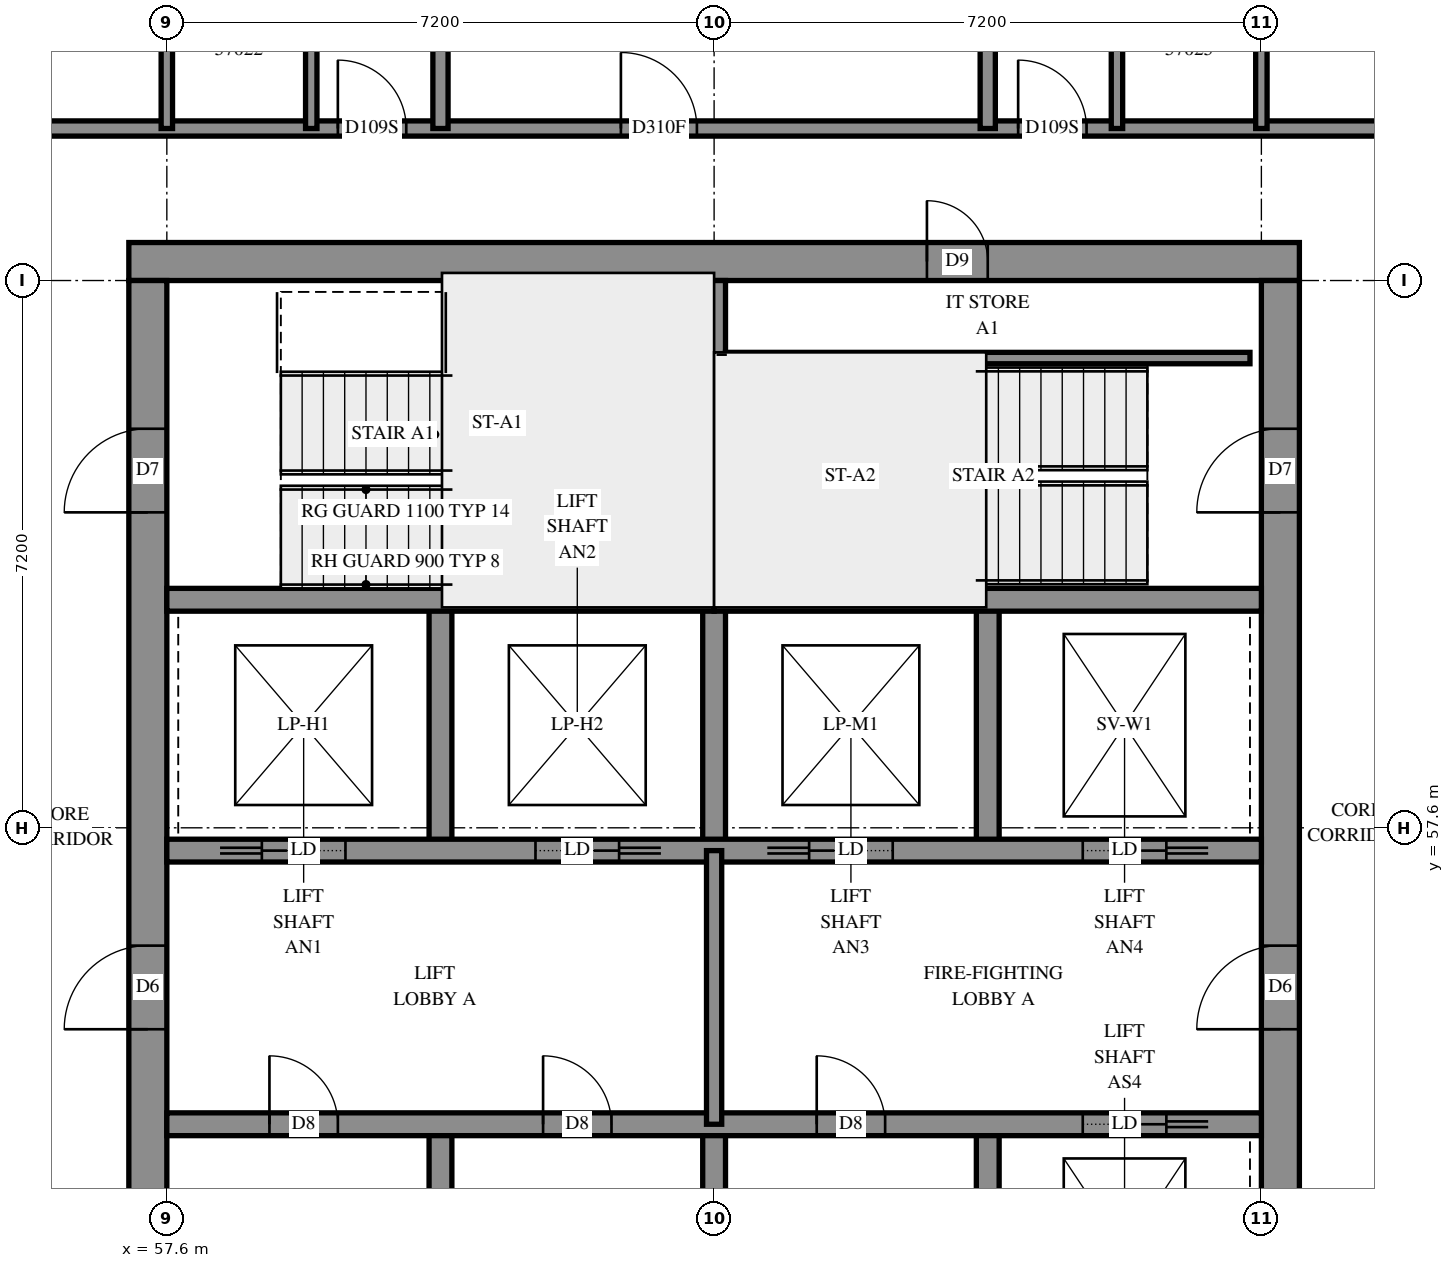
"""IFC4 building model, lengths in metres.
Left out: names, types, materials, properties, quantities, classifications, styles, units other than length and angle.
Written with IfcOpenShell. Run it as: python <this file> out.ifc"""

import sys

from ifc_helpers import new_model, si_unit, direction, frame, frame_2d, origin, place, context, subcontext, project, spatial, rectangle, extrude, element, fill, save


model = new_model("IFC4")
c1 = context("Model", 3, precision=1e-05, world=origin(), true_north=direction((0.0, 1.0)))
c2 = subcontext(c1, "Body", "Model", "MODEL_VIEW")
j1 = project(units=[si_unit("LENGTHUNIT", "METRE"), si_unit("PLANEANGLEUNIT", "RADIAN")], contexts=[c1])
p1 = place(None, origin())
s1 = spatial("IfcSite", under=j1, at=p1, CompositionType="ELEMENT")
p2 = place(p1, origin())
s2 = spatial("IfcBuilding", under=s1, at=p2, CompositionType="ELEMENT")
p3 = place(p2, frame((0.0, 0.0, 210.0)))
s3 = spatial("IfcBuildingStorey", under=s2, at=p3, CompositionType="ELEMENT", Elevation=210.0)
p4 = place(p3, frame((57.1, 65.05, -0.3), z_axis=(0.0, 0.0, 1.0), x_axis=(1.0, 0.0, 0.0)))
e1 = element("IfcWall", 1, at=p4, inside=s3, PredefinedType="SHEAR", context=c2, shape_type="SweptSolid", body=[
    extrude(rectangle(XDim=15.4, YDim=0.5, at=frame_2d((7.7, 0.0))), origin(), (0.0, 0.0, 1.0), 2.7),
])
p5 = place(p4, frame((10.5, 0.0, 0.3)))
e2 = element("IfcOpeningElement", 2, at=p5, cuts=e1, PredefinedType="OPENING", context=c2, shape_type="SweptSolid", body=[
    extrude(rectangle(XDim=0.8, YDim=2.1, at=frame_2d((0.4, 1.05))), frame((0.0, 0.26, 0.0), z_axis=(0.0, -1.0, 0.0), x_axis=(1.0, 0.0, 0.0)), (0.0, 0.0, 1.0), 0.52),
])
p6 = place(p3, frame((57.35, 50.4, -0.3), z_axis=(0.0, 0.0, 1.0), x_axis=(0.0, 1.0, 0.0)))
e3 = element("IfcWall", 3, at=p6, inside=s3, PredefinedType="SHEAR", context=c2, shape_type="SweptSolid", body=[
    extrude(rectangle(XDim=14.4, YDim=0.5, at=frame_2d((7.2, 0.0))), origin(), (0.0, 0.0, 1.0), 2.7),
])
p7 = place(p6, frame((4.55, 0.0, 0.3)))
e4 = element("IfcOpeningElement", 4, at=p7, cuts=e3, PredefinedType="OPENING", context=c2, shape_type="SweptSolid", body=[
    extrude(rectangle(XDim=1.1, YDim=2.1, at=frame_2d((0.55, 1.05))), frame((0.0, 0.26, 0.0), z_axis=(0.0, -1.0, 0.0), x_axis=(1.0, 0.0, 0.0)), (0.0, 0.0, 1.0), 0.52),
])
p8 = place(p6, frame((11.35, 0.0, 0.3)))
e5 = element("IfcOpeningElement", 5, at=p8, cuts=e3, PredefinedType="OPENING", context=c2, shape_type="SweptSolid", body=[
    extrude(rectangle(XDim=1.1, YDim=2.1, at=frame_2d((0.55, 1.05))), frame((0.0, 0.26, 0.0), z_axis=(0.0, -1.0, 0.0), x_axis=(1.0, 0.0, 0.0)), (0.0, 0.0, 1.0), 0.52),
])
p9 = place(p3, frame((72.25, 50.4, -0.3), z_axis=(0.0, 0.0, 1.0), x_axis=(0.0, 1.0, 0.0)))
e6 = element("IfcWall", 6, at=p9, inside=s3, PredefinedType="SHEAR", context=c2, shape_type="SweptSolid", body=[
    extrude(rectangle(XDim=14.4, YDim=0.5, at=frame_2d((7.2, 0.0))), origin(), (0.0, 0.0, 1.0), 2.7),
])
p10 = place(p9, frame((4.55, 0.0, 0.3)))
e7 = element("IfcOpeningElement", 7, at=p10, cuts=e6, PredefinedType="OPENING", context=c2, shape_type="SweptSolid", body=[
    extrude(rectangle(XDim=1.1, YDim=2.1, at=frame_2d((0.55, 1.05))), frame((0.0, 0.26, 0.0), z_axis=(0.0, -1.0, 0.0), x_axis=(1.0, 0.0, 0.0)), (0.0, 0.0, 1.0), 0.52),
])
p11 = place(p9, frame((11.35, 0.0, 0.3)))
e8 = element("IfcOpeningElement", 8, at=p11, cuts=e6, PredefinedType="OPENING", context=c2, shape_type="SweptSolid", body=[
    extrude(rectangle(XDim=1.1, YDim=2.1, at=frame_2d((0.55, 1.05))), frame((0.0, 0.26, 0.0), z_axis=(0.0, -1.0, 0.0), x_axis=(1.0, 0.0, 0.0)), (0.0, 0.0, 1.0), 0.52),
])
for number, where, z_axis, x_axis in (
    (9, (61.2, 50.4, 0.0), (0.0, 0.0, 1.0), (0.0, 1.0, 0.0)),
    (10, (61.2, 57.3, 0.0), (0.0, 0.0, 1.0), (0.0, 1.0, 0.0)),
    (11, (64.8, 50.4, 0.0), (0.0, 0.0, 1.0), (0.0, 1.0, 0.0)),
    (12, (64.8, 57.3, 0.0), (0.0, 0.0, 1.0), (0.0, 1.0, 0.0)),
    (13, (68.4, 50.4, 0.0), (0.0, 0.0, 1.0), (0.0, 1.0, 0.0)),
    (14, (68.4, 57.3, 0.0), (0.0, 0.0, 1.0), (0.0, 1.0, 0.0)),
):
    element("IfcWall", number, at=place(p3, frame(where, z_axis=z_axis, x_axis=x_axis)), inside=s3, PredefinedType="SOLIDWALL", context=c2, shape_type="SweptSolid", body=[
        extrude(rectangle(XDim=3.3, YDim=0.3, at=frame_2d((1.65, 0.0))), origin(), (0.0, 0.0, 1.0), 3.1),
    ])
p12 = place(p3, frame((57.6, 53.7, 0.0), z_axis=(0.0, 0.0, 1.0), x_axis=(1.0, 0.0, 0.0)))
e15 = element("IfcWall", 15, at=p12, inside=s3, PredefinedType="SOLIDWALL", context=c2, shape_type="SweptSolid", body=[
    extrude(rectangle(XDim=14.4, YDim=0.3, at=frame_2d((7.2, 0.0))), origin(), (0.0, 0.0, 1.0), 3.1),
])
p13 = place(p12, frame((1.35, 0.0, 0.0)))
e16 = element("IfcOpeningElement", 16, at=p13, cuts=e15, PredefinedType="OPENING", context=c2, shape_type="SweptSolid", body=[
    extrude(rectangle(XDim=0.9, YDim=2.1, at=frame_2d((0.45, 1.05))), frame((0.0, 0.16, 0.0), z_axis=(0.0, -1.0, 0.0), x_axis=(1.0, 0.0, 0.0)), (0.0, 0.0, 1.0), 0.32),
])
p14 = place(p12, frame((4.95, 0.0, 0.0)))
e17 = element("IfcOpeningElement", 17, at=p14, cuts=e15, PredefinedType="OPENING", context=c2, shape_type="SweptSolid", body=[
    extrude(rectangle(XDim=0.9, YDim=2.1, at=frame_2d((0.45, 1.05))), frame((0.0, 0.16, 0.0), z_axis=(0.0, -1.0, 0.0), x_axis=(1.0, 0.0, 0.0)), (0.0, 0.0, 1.0), 0.32),
])
p15 = place(p12, frame((8.55, 0.0, 0.0)))
e18 = element("IfcOpeningElement", 18, at=p15, cuts=e15, PredefinedType="OPENING", context=c2, shape_type="SweptSolid", body=[
    extrude(rectangle(XDim=0.9, YDim=2.1, at=frame_2d((0.45, 1.05))), frame((0.0, 0.16, 0.0), z_axis=(0.0, -1.0, 0.0), x_axis=(1.0, 0.0, 0.0)), (0.0, 0.0, 1.0), 0.32),
])
p16 = place(p12, frame((12.05, 0.0, 0.0)))
e19 = element("IfcOpeningElement", 19, at=p16, cuts=e15, PredefinedType="OPENING", context=c2, shape_type="SweptSolid", body=[
    extrude(rectangle(XDim=1.1, YDim=2.1, at=frame_2d((0.55, 1.05))), frame((0.0, 0.16, 0.0), z_axis=(0.0, -1.0, 0.0), x_axis=(1.0, 0.0, 0.0)), (0.0, 0.0, 1.0), 0.32),
])
p17 = place(p3, frame((57.6, 57.3, 0.0), z_axis=(0.0, 0.0, 1.0), x_axis=(1.0, 0.0, 0.0)))
e20 = element("IfcWall", 20, at=p17, inside=s3, PredefinedType="SOLIDWALL", context=c2, shape_type="SweptSolid", body=[
    extrude(rectangle(XDim=14.4, YDim=0.3, at=frame_2d((7.2, 0.0))), origin(), (0.0, 0.0, 1.0), 3.1),
])
p18 = place(p17, frame((1.25, 0.0, 0.0)))
e21 = element("IfcOpeningElement", 21, at=p18, cuts=e20, PredefinedType="OPENING", context=c2, shape_type="SweptSolid", body=[
    extrude(rectangle(XDim=1.1, YDim=2.1, at=frame_2d((0.55, 1.05))), frame((0.0, 0.16, 0.0), z_axis=(0.0, -1.0, 0.0), x_axis=(1.0, 0.0, 0.0)), (0.0, 0.0, 1.0), 0.32),
])
p19 = place(p17, frame((4.85, 0.0, 0.0)))
e22 = element("IfcOpeningElement", 22, at=p19, cuts=e20, PredefinedType="OPENING", context=c2, shape_type="SweptSolid", body=[
    extrude(rectangle(XDim=1.1, YDim=2.1, at=frame_2d((0.55, 1.05))), frame((0.0, 0.16, 0.0), z_axis=(0.0, -1.0, 0.0), x_axis=(1.0, 0.0, 0.0)), (0.0, 0.0, 1.0), 0.32),
])
p20 = place(p17, frame((8.45, 0.0, 0.0)))
e23 = element("IfcOpeningElement", 23, at=p20, cuts=e20, PredefinedType="OPENING", context=c2, shape_type="SweptSolid", body=[
    extrude(rectangle(XDim=1.1, YDim=2.1, at=frame_2d((0.55, 1.05))), frame((0.0, 0.16, 0.0), z_axis=(0.0, -1.0, 0.0), x_axis=(1.0, 0.0, 0.0)), (0.0, 0.0, 1.0), 0.32),
])
p21 = place(p17, frame((12.05, 0.0, 0.0)))
e24 = element("IfcOpeningElement", 24, at=p21, cuts=e20, PredefinedType="OPENING", context=c2, shape_type="SweptSolid", body=[
    extrude(rectangle(XDim=1.1, YDim=2.1, at=frame_2d((0.55, 1.05))), frame((0.0, 0.16, 0.0), z_axis=(0.0, -1.0, 0.0), x_axis=(1.0, 0.0, 0.0)), (0.0, 0.0, 1.0), 0.32),
])
for number, where, z_axis, x_axis in (
    (25, (57.6, 60.6, 0.0), (0.0, 0.0, 1.0), (1.0, 0.0, 0.0)),
    (26, (64.8, 60.6, 0.0), (0.0, 0.0, 1.0), (1.0, 0.0, 0.0)),
):
    element("IfcWall", number, at=place(p3, frame(where, z_axis=z_axis, x_axis=x_axis)), inside=s3, PredefinedType="SOLIDWALL", context=c2, shape_type="SweptSolid", body=[
        extrude(rectangle(XDim=7.2, YDim=0.3, at=frame_2d((3.6, 0.0))), origin(), (0.0, 0.0, 1.0), 3.1),
    ])
p22 = place(p3, frame((64.8, 60.6, 0.0), z_axis=(0.0, 0.0, 1.0), x_axis=(0.0, 1.0, 0.0)))
e27 = element("IfcWall", 27, at=p22, inside=s3, PredefinedType="SOLIDWALL", context=c2, shape_type="SweptSolid", body=[
    extrude(rectangle(XDim=4.2, YDim=0.3, at=frame_2d((2.1, 0.0))), origin(), (0.0, 0.0, 1.0), 3.1),
])
p23 = place(p3, frame((64.95, 63.78, 0.0), z_axis=(0.0, 0.0, 1.0), x_axis=(1.0, 0.0, 0.0)))
e28 = element("IfcWall", 28, at=p23, inside=s3, PredefinedType="PARTITIONING", context=c2, shape_type="SweptSolid", body=[
    extrude(rectangle(XDim=6.9, YDim=0.15, at=frame_2d((3.45, 0.0))), origin(), (0.0, 0.0, 1.0), 3.1),
])
p24 = place(p3, frame((64.8, 53.7, 0.0), z_axis=(0.0, 0.0, 1.0), x_axis=(0.0, 1.0, 0.0)))
e29 = element("IfcWall", 29, at=p24, inside=s3, PredefinedType="PARTITIONING", context=c2, shape_type="SweptSolid", body=[
    extrude(rectangle(XDim=3.6, YDim=0.2, at=frame_2d((1.8, 0.0))), origin(), (0.0, 0.0, 1.0), 3.1),
])
p25 = place(p3, frame((55.6, 66.8, 0.0), z_axis=(0.0, 0.0, 1.0), x_axis=(1.0, 0.0, 0.0)))
e30 = element("IfcWall", 30, at=p25, inside=s3, PredefinedType="PARTITIONING", context=c2, shape_type="SweptSolid", body=[
    extrude(rectangle(XDim=18.4, YDim=0.2, at=frame_2d((9.2, 0.0))), origin(), (0.0, 0.0, 1.0), 3.1),
])
p26 = place(p25, frame((4.25, 0.0, 0.0)))
e31 = element("IfcOpeningElement", 31, at=p26, cuts=e30, PredefinedType="OPENING", context=c2, shape_type="SweptSolid", body=[
    extrude(rectangle(XDim=0.9, YDim=2.1, at=frame_2d((0.45, 1.05))), frame((0.0, 0.11, 0.0), z_axis=(0.0, -1.0, 0.0), x_axis=(1.0, 0.0, 0.0)), (0.0, 0.0, 1.0), 0.22),
])
p27 = place(p25, frame((7.974, 0.0, 0.0)))
e32 = element("IfcOpeningElement", 32, at=p27, cuts=e30, PredefinedType="OPENING", context=c2, shape_type="SweptSolid", body=[
    extrude(rectangle(XDim=1.0, YDim=2.1, at=frame_2d((0.5, 1.05))), frame((0.0, 0.11, 0.0), z_axis=(0.0, -1.0, 0.0), x_axis=(1.0, 0.0, 0.0)), (0.0, 0.0, 1.0), 0.22),
])
p28 = place(p25, frame((13.2, 0.0, 0.0)))
e33 = element("IfcOpeningElement", 33, at=p28, cuts=e30, PredefinedType="OPENING", context=c2, shape_type="SweptSolid", body=[
    extrude(rectangle(XDim=0.9, YDim=2.1, at=frame_2d((0.45, 1.05))), frame((0.0, 0.11, 0.0), z_axis=(0.0, -1.0, 0.0), x_axis=(1.0, 0.0, 0.0)), (0.0, 0.0, 1.0), 0.22),
])
p29 = place(p3, frame((68.4, 66.8, 0.0), z_axis=(0.0, 0.0, 1.0), x_axis=(0.0, 1.0, 0.0)))
e34 = element("IfcWall", 34, at=p29, inside=s3, PredefinedType="PARTITIONING", context=c2, shape_type="SweptSolid", body=[
    extrude(rectangle(XDim=5.928, YDim=0.2, at=frame_2d((2.964, 0.0))), origin(), (0.0, 0.0, 1.0), 3.1),
])
p30 = place(p3, frame((61.2, 66.8, 0.0), z_axis=(0.0, 0.0, 1.0), x_axis=(0.0, 1.0, 0.0)))
e35 = element("IfcWall", 35, at=p30, inside=s3, PredefinedType="PARTITIONING", context=c2, shape_type="SweptSolid", body=[
    extrude(rectangle(XDim=5.922, YDim=0.2, at=frame_2d((2.961, 0.0))), origin(), (0.0, 0.0, 1.0), 3.1),
])
for number, where, z_axis, x_axis in (
    (36, (57.6, 66.8, 0.0), (0.0, 0.0, 1.0), (0.0, 1.0, 0.0)),
    (37, (59.5, 66.8, 0.0), (0.0, 0.0, 1.0), (0.0, 1.0, 0.0)),
    (38, (70.1, 66.8, 0.0), (0.0, 0.0, 1.0), (0.0, 1.0, 0.0)),
    (39, (72.0, 66.8, 0.0), (0.0, 0.0, 1.0), (0.0, 1.0, 0.0)),
):
    element("IfcWall", number, at=place(p3, frame(where, z_axis=z_axis, x_axis=x_axis)), inside=s3, PredefinedType="PARTITIONING", context=c2, shape_type="SweptSolid", body=[
        extrude(rectangle(XDim=2.4, YDim=0.15, at=frame_2d((1.2, 0.0))), origin(), (0.0, 0.0, 1.0), 3.1),
    ])
p31 = place(p5, origin())
e40 = element("IfcDoor", 40, at=p31, inside=s3, OperationType="SINGLE_SWING_RIGHT", PredefinedType="DOOR", context=c2, shape_type="SweptSolid", body=[
    extrude(rectangle(XDim=0.8, YDim=2.1, at=frame_2d((0.4, 1.05))), frame((0.0, 0.025, 0.0), z_axis=(0.0, -1.0, 0.0), x_axis=(1.0, 0.0, 0.0)), (0.0, 0.0, 1.0), 0.05),
])
fill(e2, e40)
p32 = place(p7, origin())
e41 = element("IfcDoor", 41, at=p32, inside=s3, OperationType="DOUBLE_DOOR_SINGLE_SWING", PredefinedType="DOOR", context=c2, shape_type="SweptSolid", body=[
    extrude(rectangle(XDim=1.1, YDim=2.1, at=frame_2d((0.55, 1.05))), frame((0.0, 0.025, 0.0), z_axis=(0.0, -1.0, 0.0), x_axis=(1.0, 0.0, 0.0)), (0.0, 0.0, 1.0), 0.05),
])
fill(e4, e41)
p33 = place(p10, origin())
e42 = element("IfcDoor", 42, at=p33, inside=s3, OperationType="DOUBLE_DOOR_SINGLE_SWING", PredefinedType="DOOR", context=c2, shape_type="SweptSolid", body=[
    extrude(rectangle(XDim=1.1, YDim=2.1, at=frame_2d((0.55, 1.05))), frame((0.0, 0.025, 0.0), z_axis=(0.0, -1.0, 0.0), x_axis=(1.0, 0.0, 0.0)), (0.0, 0.0, 1.0), 0.05),
])
fill(e7, e42)
p34 = place(p8, origin())
e43 = element("IfcDoor", 43, at=p34, inside=s3, OperationType="SINGLE_SWING_LEFT", PredefinedType="DOOR", context=c2, shape_type="SweptSolid", body=[
    extrude(rectangle(XDim=1.1, YDim=2.1, at=frame_2d((0.55, 1.05))), frame((0.0, 0.025, 0.0), z_axis=(0.0, -1.0, 0.0), x_axis=(1.0, 0.0, 0.0)), (0.0, 0.0, 1.0), 0.05),
])
fill(e5, e43)
p35 = place(p11, origin())
e44 = element("IfcDoor", 44, at=p35, inside=s3, OperationType="SINGLE_SWING_RIGHT", PredefinedType="DOOR", context=c2, shape_type="SweptSolid", body=[
    extrude(rectangle(XDim=1.1, YDim=2.1, at=frame_2d((0.55, 1.05))), frame((0.0, 0.025, 0.0), z_axis=(0.0, -1.0, 0.0), x_axis=(1.0, 0.0, 0.0)), (0.0, 0.0, 1.0), 0.05),
])
fill(e8, e44)
p36 = place(p13, origin())
e45 = element("IfcDoor", 45, at=p36, inside=s3, OperationType="SINGLE_SWING_LEFT", PredefinedType="DOOR", context=c2, shape_type="SweptSolid", body=[
    extrude(rectangle(XDim=0.9, YDim=2.1, at=frame_2d((0.45, 1.05))), frame((0.0, 0.025, 0.0), z_axis=(0.0, -1.0, 0.0), x_axis=(1.0, 0.0, 0.0)), (0.0, 0.0, 1.0), 0.05),
])
fill(e16, e45)
p37 = place(p14, origin())
e46 = element("IfcDoor", 46, at=p37, inside=s3, OperationType="SINGLE_SWING_LEFT", PredefinedType="DOOR", context=c2, shape_type="SweptSolid", body=[
    extrude(rectangle(XDim=0.9, YDim=2.1, at=frame_2d((0.45, 1.05))), frame((0.0, 0.025, 0.0), z_axis=(0.0, -1.0, 0.0), x_axis=(1.0, 0.0, 0.0)), (0.0, 0.0, 1.0), 0.05),
])
fill(e17, e46)
p38 = place(p15, origin())
e47 = element("IfcDoor", 47, at=p38, inside=s3, OperationType="SINGLE_SWING_LEFT", PredefinedType="DOOR", context=c2, shape_type="SweptSolid", body=[
    extrude(rectangle(XDim=0.9, YDim=2.1, at=frame_2d((0.45, 1.05))), frame((0.0, 0.025, 0.0), z_axis=(0.0, -1.0, 0.0), x_axis=(1.0, 0.0, 0.0)), (0.0, 0.0, 1.0), 0.05),
])
fill(e18, e47)
p39 = place(p16, origin())
e48 = element("IfcDoor", 48, at=p39, inside=s3, OperationType="SLIDING_TO_RIGHT", PredefinedType="DOOR", context=c2, shape_type="SweptSolid", body=[
    extrude(rectangle(XDim=1.1, YDim=2.1, at=frame_2d((0.55, 1.05))), frame((0.0, 0.025, 0.0), z_axis=(0.0, -1.0, 0.0), x_axis=(1.0, 0.0, 0.0)), (0.0, 0.0, 1.0), 0.05),
])
fill(e19, e48)
p40 = place(p18, origin())
e49 = element("IfcDoor", 49, at=p40, inside=s3, OperationType="SLIDING_TO_LEFT", PredefinedType="DOOR", context=c2, shape_type="SweptSolid", body=[
    extrude(rectangle(XDim=1.1, YDim=2.1, at=frame_2d((0.55, 1.05))), frame((0.0, 0.025, 0.0), z_axis=(0.0, -1.0, 0.0), x_axis=(1.0, 0.0, 0.0)), (0.0, 0.0, 1.0), 0.05),
])
fill(e21, e49)
p41 = place(p19, origin())
e50 = element("IfcDoor", 50, at=p41, inside=s3, OperationType="SLIDING_TO_RIGHT", PredefinedType="DOOR", context=c2, shape_type="SweptSolid", body=[
    extrude(rectangle(XDim=1.1, YDim=2.1, at=frame_2d((0.55, 1.05))), frame((0.0, 0.025, 0.0), z_axis=(0.0, -1.0, 0.0), x_axis=(1.0, 0.0, 0.0)), (0.0, 0.0, 1.0), 0.05),
])
fill(e22, e50)
p42 = place(p20, origin())
e51 = element("IfcDoor", 51, at=p42, inside=s3, OperationType="SLIDING_TO_LEFT", PredefinedType="DOOR", context=c2, shape_type="SweptSolid", body=[
    extrude(rectangle(XDim=1.1, YDim=2.1, at=frame_2d((0.55, 1.05))), frame((0.0, 0.025, 0.0), z_axis=(0.0, -1.0, 0.0), x_axis=(1.0, 0.0, 0.0)), (0.0, 0.0, 1.0), 0.05),
])
fill(e23, e51)
p43 = place(p21, origin())
e52 = element("IfcDoor", 52, at=p43, inside=s3, OperationType="SLIDING_TO_RIGHT", PredefinedType="DOOR", context=c2, shape_type="SweptSolid", body=[
    extrude(rectangle(XDim=1.1, YDim=2.1, at=frame_2d((0.55, 1.05))), frame((0.0, 0.025, 0.0), z_axis=(0.0, -1.0, 0.0), x_axis=(1.0, 0.0, 0.0)), (0.0, 0.0, 1.0), 0.05),
])
fill(e24, e52)
p44 = place(p26, origin())
e53 = element("IfcDoor", 53, at=p44, inside=s3, OperationType="SINGLE_SWING_RIGHT", PredefinedType="DOOR", context=c2, shape_type="SweptSolid", body=[
    extrude(rectangle(XDim=0.9, YDim=2.1, at=frame_2d((0.45, 1.05))), frame((0.0, 0.025, 0.0), z_axis=(0.0, -1.0, 0.0), x_axis=(1.0, 0.0, 0.0)), (0.0, 0.0, 1.0), 0.05),
])
fill(e31, e53)
p45 = place(p27, origin())
e54 = element("IfcDoor", 54, at=p45, inside=s3, OperationType="SINGLE_SWING_LEFT", PredefinedType="DOOR", context=c2, shape_type="SweptSolid", body=[
    extrude(rectangle(XDim=1.0, YDim=2.1, at=frame_2d((0.5, 1.05))), frame((0.0, 0.025, 0.0), z_axis=(0.0, -1.0, 0.0), x_axis=(1.0, 0.0, 0.0)), (0.0, 0.0, 1.0), 0.05),
])
fill(e32, e54)
p46 = place(p28, origin())
e55 = element("IfcDoor", 55, at=p46, inside=s3, OperationType="SINGLE_SWING_LEFT", PredefinedType="DOOR", context=c2, shape_type="SweptSolid", body=[
    extrude(rectangle(XDim=0.9, YDim=2.1, at=frame_2d((0.45, 1.05))), frame((0.0, 0.025, 0.0), z_axis=(0.0, -1.0, 0.0), x_axis=(1.0, 0.0, 0.0)), (0.0, 0.0, 1.0), 0.05),
])
fill(e33, e55)
save(model, sys.argv[1])
